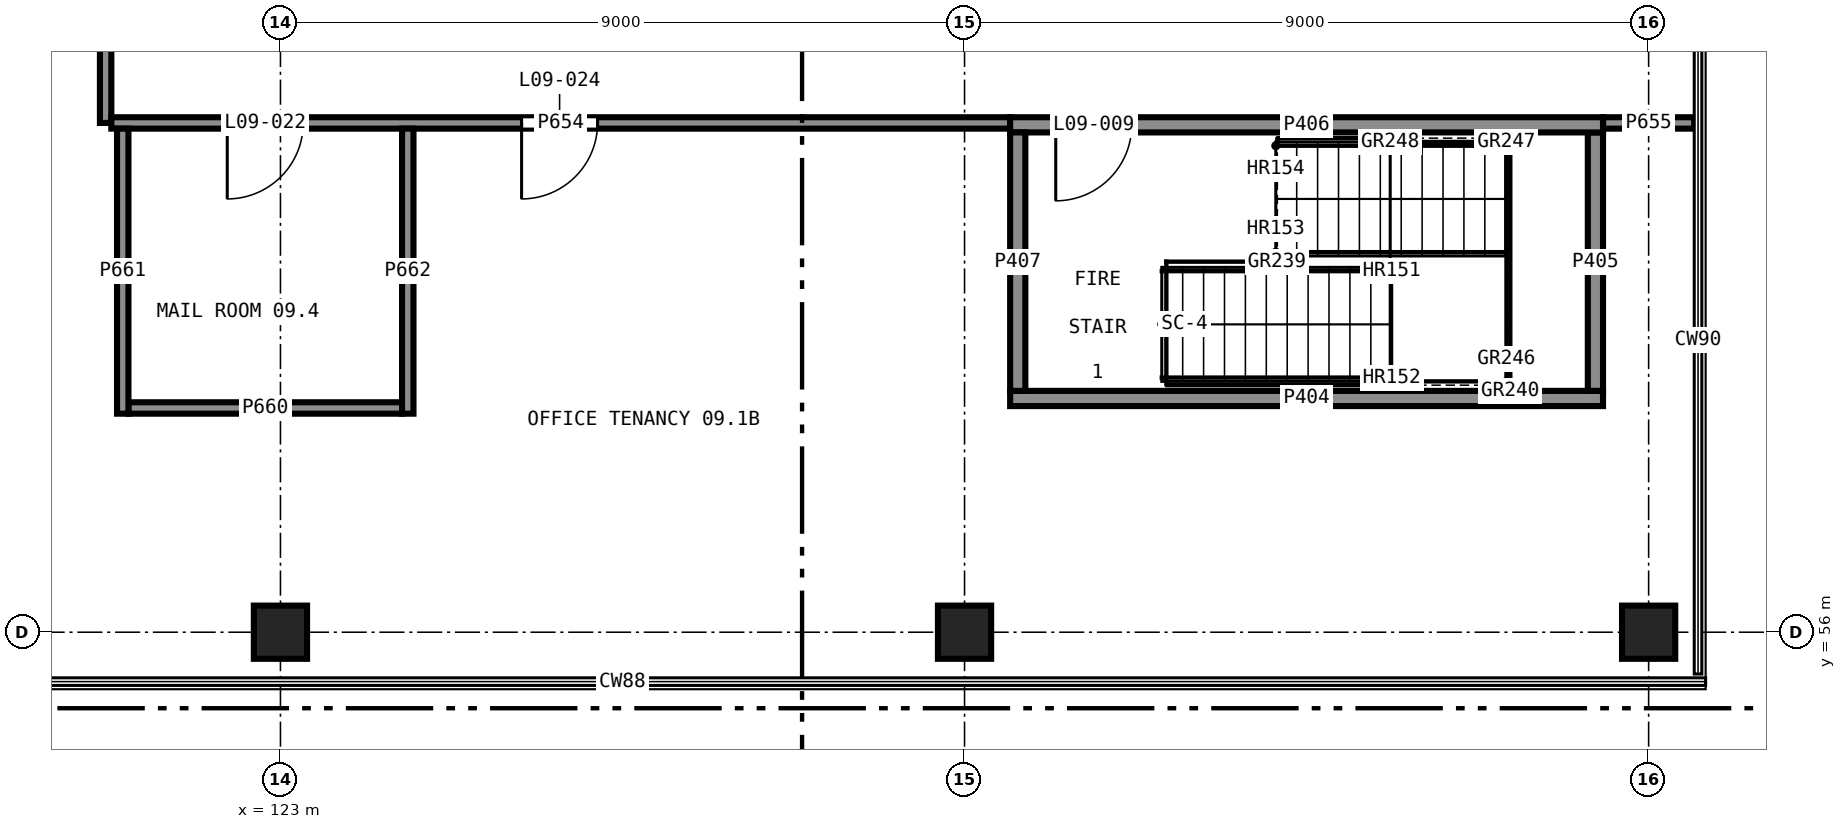
"""IFC4 building model, lengths in metres.
Left out: names, types, materials, properties, quantities, classifications, styles, units other than length and angle.
Written with IfcOpenShell. Run it as: python <this file> out.ifc"""

import sys

from ifc_helpers import new_model, si_unit, direction, frame, frame_2d, origin, origin_2d, place, context, subcontext, project, spatial, rectangle, extrude, element, fill, save


model = new_model("IFC4")
c1 = context("Model", 3, precision=1e-05, world=origin(), true_north=direction((0.0, 1.0)))
c2 = subcontext(c1, "Body", "Model", "MODEL_VIEW")
j1 = project(units=[si_unit("LENGTHUNIT", "METRE"), si_unit("PLANEANGLEUNIT", "RADIAN")], contexts=[c1])
p1 = place(None, origin())
s1 = spatial("IfcSite", under=j1, at=p1, CompositionType="ELEMENT")
p2 = place(p1, origin())
s2 = spatial("IfcBuilding", under=s1, at=p2, CompositionType="ELEMENT")
p3 = place(p2, frame((0.0, 0.0, 37.5)))
s3 = spatial("IfcBuildingStorey", under=s2, at=p3, CompositionType="ELEMENT", Elevation=37.5)
for number, where, z_axis, x_axis in (
    (1, (123.0, 56.0, 0.0), (0.0, 0.0, 1.0), (1.0, 0.0, 0.0)),
    (2, (132.0, 56.0, 0.0), (0.0, 0.0, 1.0), (1.0, 0.0, 0.0)),
    (3, (141.0, 56.0, 0.0), (0.0, 0.0, 1.0), (1.0, 0.0, 0.0)),
):
    element("IfcColumn", number, at=place(p3, frame(where, z_axis=z_axis, x_axis=x_axis)), inside=s3, PredefinedType="COLUMN", context=c2, shape_type="SweptSolid", body=[
        extrude(rectangle(XDim=0.7, YDim=0.7, at=origin_2d()), origin(), (0.0, 0.0, 1.0), 4.0),
    ])
p4 = place(p3, frame((132.6, 59.075, 0.0), z_axis=(0.0, 0.0, 1.0), x_axis=(1.0, 0.0, 0.0)))
e4 = element("IfcWall", 4, at=p4, inside=s3, PredefinedType="SHEAR", context=c2, shape_type="SweptSolid", body=[
    extrude(rectangle(XDim=7.8, YDim=0.2, at=frame_2d((3.9, 0.0))), origin(), (0.0, 0.0, 1.0), 3.58),
])
p5 = place(p3, frame((140.3, 59.175, 0.0), z_axis=(0.0, 0.0, 1.0), x_axis=(0.0, 1.0, 0.0)))
e5 = element("IfcWall", 5, at=p5, inside=s3, PredefinedType="SHEAR", context=c2, shape_type="SweptSolid", body=[
    extrude(rectangle(XDim=3.4, YDim=0.2, at=frame_2d((1.7, 0.0))), origin(), (0.0, 0.0, 1.0), 3.58),
])
p6 = place(p3, frame((140.4, 62.675, 0.0), z_axis=(0.0, 0.0, 1.0), x_axis=(-1.0, 0.0, 0.0)))
e6 = element("IfcWall", 6, at=p6, inside=s3, PredefinedType="SHEAR", context=c2, shape_type="SweptSolid", body=[
    extrude(rectangle(XDim=7.8, YDim=0.2, at=frame_2d((3.9, 0.0))), origin(), (0.0, 0.0, 1.0), 3.58),
])
p7 = place(p6, frame((6.2, 0.0, 0.0)))
e7 = element("IfcOpeningElement", 7, at=p7, cuts=e6, PredefinedType="OPENING", context=c2, shape_type="SweptSolid", body=[
    extrude(rectangle(XDim=1.0, YDim=2.1, at=frame_2d((0.5, 1.05))), frame((0.0, 0.11, 0.0), z_axis=(0.0, -1.0, 0.0), x_axis=(1.0, 0.0, 0.0)), (0.0, 0.0, 1.0), 0.22),
])
p8 = place(p3, frame((132.7, 62.575, 0.0), z_axis=(0.0, 0.0, 1.0), x_axis=(0.0, -1.0, 0.0)))
e8 = element("IfcWall", 8, at=p8, inside=s3, PredefinedType="SHEAR", context=c2, shape_type="SweptSolid", body=[
    extrude(rectangle(XDim=3.4, YDim=0.2, at=frame_2d((1.7, 0.0))), origin(), (0.0, 0.0, 1.0), 3.58),
])
p9 = place(p3, frame((120.7, 62.7, 0.0), z_axis=(0.0, 0.0, 1.0), x_axis=(0.0, 1.0, 0.0)))
e9 = element("IfcWall", 9, at=p9, inside=s3, PredefinedType="PARTITIONING", context=c2, shape_type="SweptSolid", body=[
    extrude(rectangle(XDim=22.525, YDim=0.15, at=frame_2d((11.263, 0.0))), origin(), (0.0, 0.0, 1.0), 3.58),
])
p10 = place(p9, frame((16.435, 0.0, 0.0)))
e10 = element("IfcOpeningElement", 10, at=p10, cuts=e9, PredefinedType="OPENING", context=c2, shape_type="SweptSolid", body=[
    extrude(rectangle(XDim=1.0, YDim=2.1, at=frame_2d((0.5, 1.05))), frame((0.0, 0.085, 0.0), z_axis=(0.0, -1.0, 0.0), x_axis=(1.0, 0.0, 0.0)), (0.0, 0.0, 1.0), 0.17),
])
p11 = place(p3, frame((132.6, 62.7, 0.0), z_axis=(0.0, 0.0, 1.0), x_axis=(-1.0, 0.0, 0.0)))
e11 = element("IfcWall", 11, at=p11, inside=s3, PredefinedType="PARTITIONING", context=c2, shape_type="SweptSolid", body=[
    extrude(rectangle(XDim=11.825, YDim=0.15, at=frame_2d((5.913, 0.0))), origin(), (0.0, 0.0, 1.0), 3.58),
])
p12 = place(p11, frame((9.3, 0.0, 0.0)))
e12 = element("IfcOpeningElement", 12, at=p12, cuts=e11, PredefinedType="OPENING", context=c2, shape_type="SweptSolid", body=[
    extrude(rectangle(XDim=1.0, YDim=2.1, at=frame_2d((0.5, 1.05))), frame((0.0, 0.085, 0.0), z_axis=(0.0, -1.0, 0.0), x_axis=(1.0, 0.0, 0.0)), (0.0, 0.0, 1.0), 0.17),
])
p13 = place(p11, frame((5.427, 0.0, 0.0)))
e13 = element("IfcOpeningElement", 13, at=p13, cuts=e11, PredefinedType="OPENING", context=c2, shape_type="SweptSolid", body=[
    extrude(rectangle(XDim=1.0, YDim=2.1, at=frame_2d((0.5, 1.05))), frame((0.0, 0.085, 0.0), z_axis=(0.0, -1.0, 0.0), x_axis=(1.0, 0.0, 0.0)), (0.0, 0.0, 1.0), 0.17),
])
p14 = place(p3, frame((141.6, 62.7, 0.0), z_axis=(0.0, 0.0, 1.0), x_axis=(-1.0, 0.0, 0.0)))
e14 = element("IfcWall", 14, at=p14, inside=s3, PredefinedType="PARTITIONING", context=c2, shape_type="SweptSolid", body=[
    extrude(rectangle(XDim=1.2, YDim=0.15, at=frame_2d((0.6, 0.0))), origin(), (0.0, 0.0, 1.0), 3.58),
])
p15 = place(p3, frame((121.0, 58.95, 0.0), z_axis=(0.0, 0.0, 1.0), x_axis=(1.0, 0.0, 0.0)))
e15 = element("IfcWall", 15, at=p15, inside=s3, PredefinedType="PARTITIONING", context=c2, shape_type="SweptSolid", body=[
    extrude(rectangle(XDim=3.6, YDim=0.15, at=frame_2d((1.8, 0.0))), origin(), (0.0, 0.0, 1.0), 3.58),
])
for number, where, z_axis, x_axis in (
    (16, (120.925, 62.625, 0.0), (0.0, 0.0, 1.0), (0.0, -1.0, 0.0)),
    (17, (124.675, 62.625, 0.0), (0.0, 0.0, 1.0), (0.0, -1.0, 0.0)),
):
    element("IfcWall", number, at=place(p3, frame(where, z_axis=z_axis, x_axis=x_axis)), inside=s3, PredefinedType="PARTITIONING", context=c2, shape_type="SweptSolid", body=[
        extrude(rectangle(XDim=3.75, YDim=0.15, at=frame_2d((1.875, 0.0))), origin(), (0.0, 0.0, 1.0), 3.58),
    ])
p16 = place(p7, origin())
e18 = element("IfcDoor", 18, at=p16, inside=s3, OperationType="SINGLE_SWING_LEFT", PredefinedType="DOOR", context=c2, shape_type="SweptSolid", body=[
    extrude(rectangle(XDim=1.0, YDim=2.1, at=frame_2d((0.5, 1.05))), frame((0.0, 0.025, 0.0), z_axis=(0.0, -1.0, 0.0), x_axis=(1.0, 0.0, 0.0)), (0.0, 0.0, 1.0), 0.05),
])
fill(e7, e18)
p17 = place(p12, origin())
e19 = element("IfcDoor", 19, at=p17, inside=s3, OperationType="SINGLE_SWING_LEFT", PredefinedType="DOOR", context=c2, shape_type="SweptSolid", body=[
    extrude(rectangle(XDim=1.0, YDim=2.1, at=frame_2d((0.5, 1.05))), frame((0.0, 0.025, 0.0), z_axis=(0.0, -1.0, 0.0), x_axis=(1.0, 0.0, 0.0)), (0.0, 0.0, 1.0), 0.05),
])
fill(e12, e19)
p18 = place(p13, origin())
e20 = element("IfcDoor", 20, at=p18, inside=s3, OperationType="SINGLE_SWING_LEFT", PredefinedType="DOOR", context=c2, shape_type="SweptSolid", body=[
    extrude(rectangle(XDim=1.0, YDim=2.1, at=frame_2d((0.5, 1.05))), frame((0.0, 0.025, 0.0), z_axis=(0.0, -1.0, 0.0), x_axis=(1.0, 0.0, 0.0)), (0.0, 0.0, 1.0), 0.05),
])
fill(e13, e20)
save(model, sys.argv[1])
